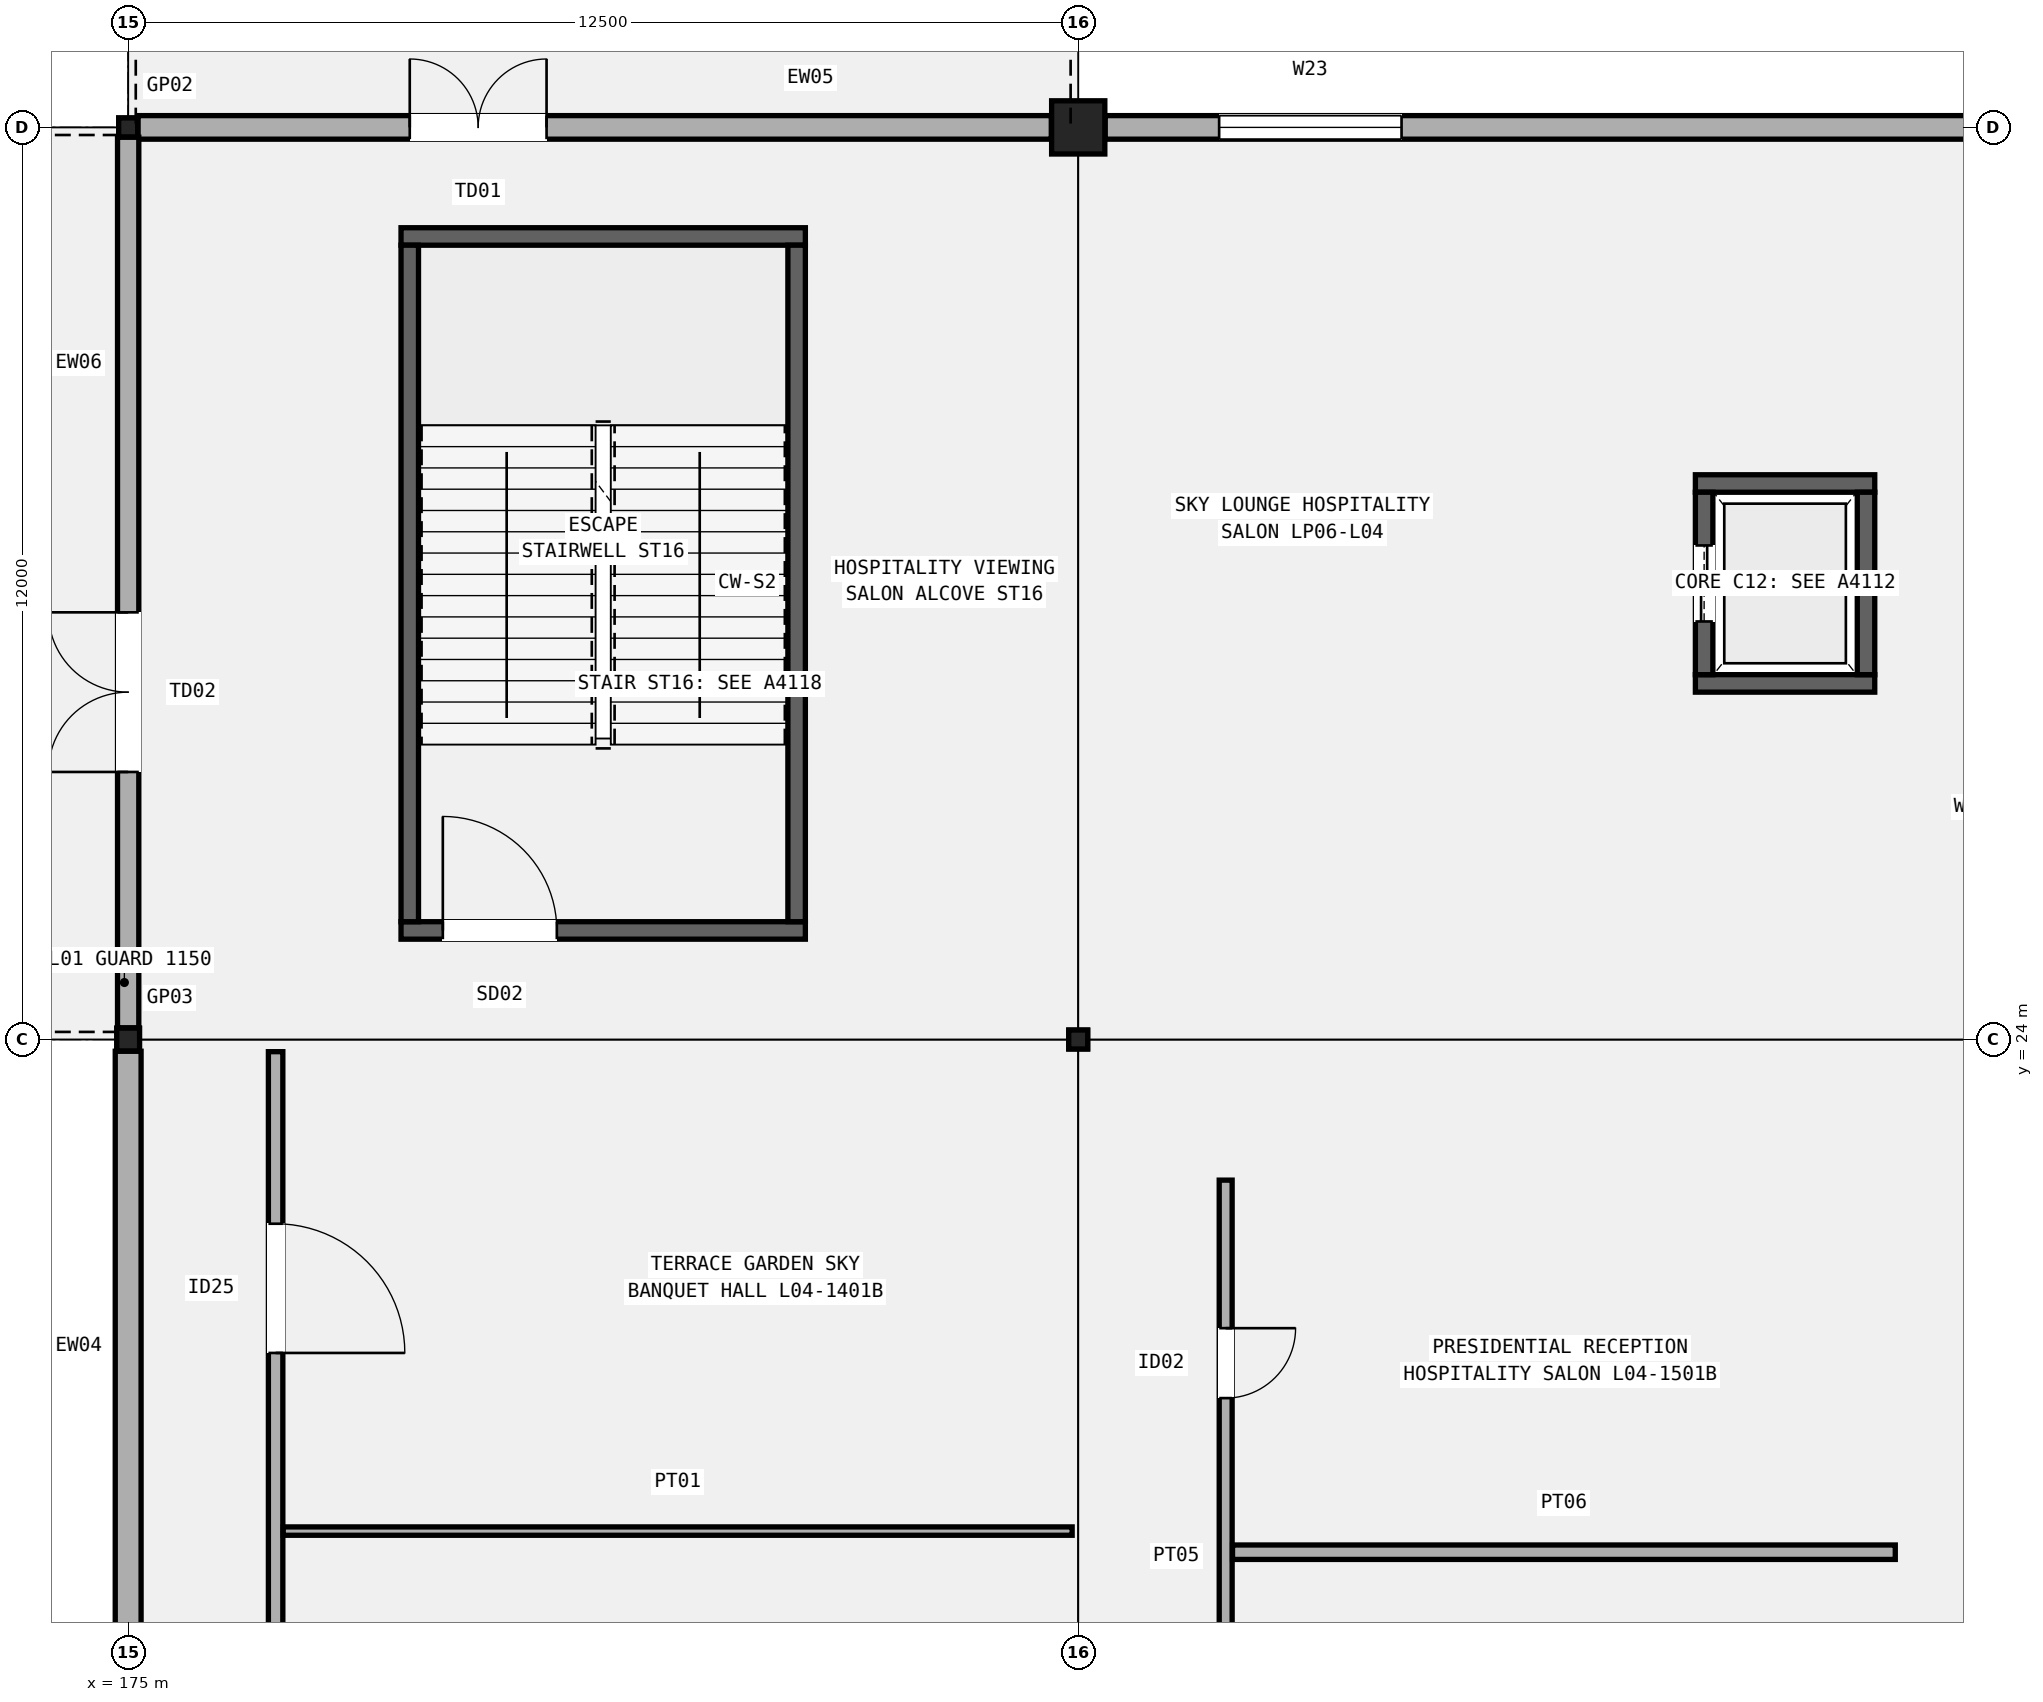
"""IFC4 building model, lengths in metres.
Left out: names, types, materials, properties, quantities, classifications, styles, units other than length and angle.
Written with IfcOpenShell. Run it as: python <this file> out.ifc"""

import sys

from ifc_helpers import new_model, si_unit, direction, frame, frame_2d, origin, origin_2d, place, context, subcontext, project, spatial, rectangle, hollow_rectangle, extrude, element, fill, save


model = new_model("IFC4")
c1 = context("Model", 3, precision=1e-05, world=origin(), true_north=direction((0.0, 1.0)))
c2 = subcontext(c1, "Body", "Model", "MODEL_VIEW")
j1 = project(units=[si_unit("LENGTHUNIT", "METRE"), si_unit("PLANEANGLEUNIT", "RADIAN")], contexts=[c1])
p1 = place(None, origin())
s1 = spatial("IfcSite", under=j1, at=p1, CompositionType="ELEMENT")
p2 = place(p1, origin())
s2 = spatial("IfcBuilding", under=s1, at=p2, CompositionType="ELEMENT")
p3 = place(p2, frame((0.0, 0.0, 20.4)))
s3 = spatial("IfcBuildingStorey", under=s2, at=p3, CompositionType="ELEMENT", Elevation=20.4)
p4 = place(p3, frame((175.0, 24.0, 0.0), z_axis=(0.0, 0.0, 1.0), x_axis=(1.0, 0.0, 0.0)))
e1 = element("IfcColumn", 1, at=p4, inside=s3, PredefinedType="COLUMN", context=c2, shape_type="SweptSolid", body=[
    extrude(hollow_rectangle(XDim=0.3, YDim=0.3, WallThickness=0.012, InnerFilletRadius=0.012, OuterFilletRadius=0.024, at=origin_2d()), origin(), (0.0, 0.0, 1.0), 5.4),
])
for number, where, z_axis, x_axis in (
    (2, (175.0, 36.0, 0.0), (0.0, 0.0, 1.0), (1.0, 0.0, 0.0)),
    (3, (187.5, 24.0, 0.0), (0.0, 0.0, 1.0), (1.0, 0.0, 0.0)),
):
    element("IfcColumn", number, at=place(p3, frame(where, z_axis=z_axis, x_axis=x_axis)), inside=s3, PredefinedType="COLUMN", context=c2, shape_type="SweptSolid", body=[
        extrude(hollow_rectangle(XDim=0.25, YDim=0.25, WallThickness=0.012, InnerFilletRadius=0.012, OuterFilletRadius=0.024, at=origin_2d()), origin(), (0.0, 0.0, 1.0), 5.4),
    ])
p5 = place(p3, frame((187.5, 36.0, 0.0), z_axis=(0.0, 0.0, 1.0), x_axis=(1.0, 0.0, 0.0)))
e4 = element("IfcColumn", 4, at=p5, inside=s3, PredefinedType="COLUMN", context=c2, shape_type="SweptSolid", body=[
    extrude(rectangle(XDim=0.7, YDim=0.7, at=origin_2d()), origin(), (0.0, 0.0, 1.0), 5.4),
])
p6 = place(p3, frame((175.0, 12.179, 0.0), z_axis=(0.0, 0.0, 1.0), x_axis=(0.0, 1.0, 0.0)))
e5 = element("IfcWall", 5, at=p6, inside=s3, PredefinedType="SOLIDWALL", context=c2, shape_type="SweptSolid", body=[
    extrude(rectangle(XDim=11.667, YDim=0.34, at=frame_2d((5.833, 0.0))), origin(), (0.0, 0.0, 1.0), 4.48),
])
p7 = place(p6, frame((1.5, 0.0, 0.95)))
e6 = element("IfcOpeningElement", 6, at=p7, cuts=e5, PredefinedType="OPENING", context=c2, shape_type="SweptSolid", body=[
    extrude(rectangle(XDim=2.1, YDim=2.25, at=frame_2d((1.05, 1.125))), frame((0.0, 0.18, 0.0), z_axis=(0.0, -1.0, 0.0), x_axis=(1.0, 0.0, 0.0)), (0.0, 0.0, 1.0), 0.36),
])
p8 = place(p3, frame((175.129, 36.0, 0.0), z_axis=(0.0, 0.0, 1.0), x_axis=(1.0, 0.0, 0.0)))
e7 = element("IfcWall", 7, at=p8, inside=s3, PredefinedType="SOLIDWALL", context=c2, shape_type="SweptSolid", body=[
    extrude(rectangle(XDim=12.017, YDim=0.31, at=frame_2d((6.009, 0.0))), origin(), (0.0, 0.0, 1.0), 4.592),
])
p9 = place(p8, frame((3.576, 0.0, 0.0)))
e8 = element("IfcOpeningElement", 8, at=p9, cuts=e7, PredefinedType="OPENING", context=c2, shape_type="SweptSolid", body=[
    extrude(rectangle(XDim=1.8, YDim=2.3, at=frame_2d((0.9, 1.15))), frame((0.0, 0.165, 0.0), z_axis=(0.0, -1.0, 0.0), x_axis=(1.0, 0.0, 0.0)), (0.0, 0.0, 1.0), 0.33),
])
p10 = place(p3, frame((175.0, 24.154, 0.0), z_axis=(0.0, 0.0, 1.0), x_axis=(0.0, 1.0, 0.0)))
e9 = element("IfcWall", 9, at=p10, inside=s3, PredefinedType="SOLIDWALL", context=c2, shape_type="SweptSolid", body=[
    extrude(rectangle(XDim=11.717, YDim=0.28, at=frame_2d((5.858, 0.0))), origin(), (0.0, 0.0, 1.0), 4.58),
])
p11 = place(p10, frame((3.366, 0.0, 0.0)))
e10 = element("IfcOpeningElement", 10, at=p11, cuts=e9, PredefinedType="OPENING", context=c2, shape_type="SweptSolid", body=[
    extrude(rectangle(XDim=2.1, YDim=2.35, at=frame_2d((1.05, 1.175))), frame((0.0, 0.15, 0.0), z_axis=(0.0, -1.0, 0.0), x_axis=(1.0, 0.0, 0.0)), (0.0, 0.0, 1.0), 0.3),
])
p12 = place(p3, frame((187.854, 36.0, 0.0), z_axis=(0.0, 0.0, 1.0), x_axis=(1.0, 0.0, 0.0)))
e11 = element("IfcWall", 11, at=p12, inside=s3, PredefinedType="SOLIDWALL", context=c2, shape_type="SweptSolid", body=[
    extrude(rectangle(XDim=11.842, YDim=0.31, at=frame_2d((5.921, 0.0))), origin(), (0.0, 0.0, 1.0), 4.48),
])
p13 = place(p12, frame((1.5, 0.0, 0.95)))
e12 = element("IfcOpeningElement", 12, at=p13, cuts=e11, PredefinedType="OPENING", context=c2, shape_type="SweptSolid", body=[
    extrude(rectangle(XDim=2.4, YDim=1.65, at=frame_2d((1.2, 0.825))), frame((0.0, 0.165, 0.0), z_axis=(0.0, -1.0, 0.0), x_axis=(1.0, 0.0, 0.0)), (0.0, 0.0, 1.0), 0.33),
])
p14 = place(p3, frame((178.59, 25.435, 0.0), z_axis=(0.0, 0.0, 1.0), x_axis=(1.0, 0.0, 0.0)))
e13 = element("IfcWall", 13, at=p14, inside=s3, PredefinedType="SHEAR", context=c2, shape_type="SweptSolid", body=[
    extrude(rectangle(XDim=5.32, YDim=0.23, at=frame_2d((2.66, 0.0))), origin(), (0.0, 0.0, 1.0), 5.18),
])
p15 = place(p14, frame((0.55, 0.0, 0.0)))
e14 = element("IfcOpeningElement", 14, at=p15, cuts=e13, PredefinedType="OPENING", context=c2, shape_type="SweptSolid", body=[
    extrude(rectangle(XDim=1.5, YDim=2.2, at=frame_2d((0.75, 1.1))), frame((0.0, 0.125, 0.0), z_axis=(0.0, -1.0, 0.0), x_axis=(1.0, 0.0, 0.0)), (0.0, 0.0, 1.0), 0.25),
])
p16 = place(p3, frame((178.59, 34.565, 0.0), z_axis=(0.0, 0.0, 1.0), x_axis=(1.0, 0.0, 0.0)))
e15 = element("IfcWall", 15, at=p16, inside=s3, PredefinedType="SHEAR", context=c2, shape_type="SweptSolid", body=[
    extrude(rectangle(XDim=5.32, YDim=0.23, at=frame_2d((2.66, 0.0))), origin(), (0.0, 0.0, 1.0), 5.18),
])
for number, where, z_axis, x_axis in (
    (16, (178.705, 25.55, 0.0), (0.0, 0.0, 1.0), (0.0, 1.0, 0.0)),
    (17, (183.795, 25.55, 0.0), (0.0, 0.0, 1.0), (0.0, 1.0, 0.0)),
):
    element("IfcWall", number, at=place(p3, frame(where, z_axis=z_axis, x_axis=x_axis)), inside=s3, PredefinedType="SHEAR", context=c2, shape_type="SweptSolid", body=[
        extrude(rectangle(XDim=8.9, YDim=0.23, at=frame_2d((4.45, 0.0))), origin(), (0.0, 0.0, 1.0), 5.18),
    ])
for number, where, z_axis, x_axis in (
    (18, (195.62, 28.685, 0.0), (0.0, 0.0, 1.0), (1.0, 0.0, 0.0)),
    (19, (195.62, 31.315, 0.0), (0.0, 0.0, 1.0), (1.0, 0.0, 0.0)),
):
    element("IfcWall", number, at=place(p3, frame(where, z_axis=z_axis, x_axis=x_axis)), inside=s3, PredefinedType="SHEAR", context=c2, shape_type="SweptSolid", body=[
        extrude(rectangle(XDim=2.36, YDim=0.23, at=frame_2d((1.18, 0.0))), origin(), (0.0, 0.0, 1.0), 5.18),
    ])
p17 = place(p3, frame((195.735, 28.8, 0.0), z_axis=(0.0, 0.0, 1.0), x_axis=(0.0, 1.0, 0.0)))
e20 = element("IfcWall", 20, at=p17, inside=s3, PredefinedType="SHEAR", context=c2, shape_type="SweptSolid", body=[
    extrude(rectangle(XDim=2.4, YDim=0.23, at=frame_2d((1.2, 0.0))), origin(), (0.0, 0.0, 1.0), 5.18),
])
p18 = place(p17, frame((0.7, 0.0, 0.0)))
e21 = element("IfcOpeningElement", 21, at=p18, cuts=e20, PredefinedType="OPENING", context=c2, shape_type="SweptSolid", body=[
    extrude(rectangle(XDim=1.0, YDim=2.15, at=frame_2d((0.5, 1.075))), frame((0.0, 0.125, 0.0), z_axis=(0.0, -1.0, 0.0), x_axis=(1.0, 0.0, 0.0)), (0.0, 0.0, 1.0), 0.25),
])
p19 = place(p3, frame((197.865, 28.8, 0.0), z_axis=(0.0, 0.0, 1.0), x_axis=(0.0, 1.0, 0.0)))
e22 = element("IfcWall", 22, at=p19, inside=s3, PredefinedType="SHEAR", context=c2, shape_type="SweptSolid", body=[
    extrude(rectangle(XDim=2.4, YDim=0.23, at=frame_2d((1.2, 0.0))), origin(), (0.0, 0.0, 1.0), 5.18),
])
p20 = place(p3, frame((176.94, 12.187, 0.0), z_axis=(0.0, 0.0, 1.0), x_axis=(0.0, 1.0, 0.0)))
e23 = element("IfcWall", 23, at=p20, inside=s3, PredefinedType="PARTITIONING", context=c2, shape_type="SweptSolid", body=[
    extrude(rectangle(XDim=11.653, YDim=0.19, at=frame_2d((5.827, 0.0))), origin(), (0.0, 0.0, 1.0), 4.52),
])
p21 = place(p20, frame((3.444, 0.0, 0.0), z_axis=(0.0, 0.0, 1.0), x_axis=(-1.0, 0.0, 0.0)))
e24 = element("IfcOpeningElement", 24, at=p21, cuts=e23, PredefinedType="OPENING", context=c2, shape_type="SweptSolid", body=[
    extrude(rectangle(XDim=1.65, YDim=2.28, at=frame_2d((0.825, 1.14))), frame((0.0, 0.105, 0.0), z_axis=(0.0, -1.0, 0.0), x_axis=(1.0, 0.0, 0.0)), (0.0, 0.0, 1.0), 0.21),
])
p22 = place(p20, frame((9.389, 0.0, 0.0), z_axis=(0.0, 0.0, 1.0), x_axis=(-1.0, 0.0, 0.0)))
e25 = element("IfcOpeningElement", 25, at=p22, cuts=e23, PredefinedType="OPENING", context=c2, shape_type="SweptSolid", body=[
    extrude(rectangle(XDim=1.7, YDim=2.32, at=frame_2d((0.85, 1.16))), frame((0.0, 0.105, 0.0), z_axis=(0.0, -1.0, 0.0), x_axis=(1.0, 0.0, 0.0)), (0.0, 0.0, 1.0), 0.21),
])
p23 = place(p3, frame((177.04, 17.533, 0.0), z_axis=(0.0, 0.0, 1.0), x_axis=(1.0, 0.0, 0.0)))
e26 = element("IfcWall", 26, at=p23, inside=s3, PredefinedType="PARTITIONING", context=c2, shape_type="SweptSolid", body=[
    extrude(rectangle(XDim=10.38, YDim=0.11, at=frame_2d((5.19, 0.0))), origin(), (0.0, 0.0, 1.0), 4.52),
])
p24 = place(p3, frame((189.44, 12.187, 0.0), z_axis=(0.0, 0.0, 1.0), x_axis=(0.0, 1.0, 0.0)))
e27 = element("IfcWall", 27, at=p24, inside=s3, PredefinedType="PARTITIONING", context=c2, shape_type="SweptSolid", body=[
    extrude(rectangle(XDim=9.963, YDim=0.17, at=frame_2d((4.981, 0.0))), origin(), (0.0, 0.0, 1.0), 4.52),
])
p25 = place(p24, frame((2.93, 0.0, 0.0), z_axis=(0.0, 0.0, 1.0), x_axis=(-1.0, 0.0, 0.0)))
e28 = element("IfcOpeningElement", 28, at=p25, cuts=e27, PredefinedType="OPENING", context=c2, shape_type="SweptSolid", body=[
    extrude(rectangle(XDim=0.9, YDim=2.06, at=frame_2d((0.45, 1.03))), frame((0.0, 0.095, 0.0), z_axis=(0.0, -1.0, 0.0), x_axis=(1.0, 0.0, 0.0)), (0.0, 0.0, 1.0), 0.19),
])
p26 = place(p24, frame((8.015, 0.0, 0.0), z_axis=(0.0, 0.0, 1.0), x_axis=(-1.0, 0.0, 0.0)))
e29 = element("IfcOpeningElement", 29, at=p26, cuts=e27, PredefinedType="OPENING", context=c2, shape_type="SweptSolid", body=[
    extrude(rectangle(XDim=0.92, YDim=2.1, at=frame_2d((0.46, 1.05))), frame((0.0, 0.095, 0.0), z_axis=(0.0, -1.0, 0.0), x_axis=(1.0, 0.0, 0.0)), (0.0, 0.0, 1.0), 0.19),
])
p27 = place(p3, frame((189.53, 17.255, 0.0), z_axis=(0.0, 0.0, 1.0), x_axis=(1.0, 0.0, 0.0)))
e30 = element("IfcWall", 30, at=p27, inside=s3, PredefinedType="PARTITIONING", context=c2, shape_type="SweptSolid", body=[
    extrude(rectangle(XDim=8.72, YDim=0.19, at=frame_2d((4.36, 0.0))), origin(), (0.0, 0.0, 1.0), 4.52),
])
p28 = place(p9, origin())
e31 = element("IfcDoor", 31, at=p28, inside=s3, OperationType="DOUBLE_DOOR_SINGLE_SWING", PredefinedType="DOOR", context=c2, shape_type="SweptSolid", body=[
    extrude(rectangle(XDim=1.8, YDim=2.3, at=frame_2d((0.9, 1.15))), frame((0.0, 0.025, 0.0), z_axis=(0.0, -1.0, 0.0), x_axis=(1.0, 0.0, 0.0)), (0.0, 0.0, 1.0), 0.05),
])
fill(e8, e31)
p29 = place(p11, origin())
e32 = element("IfcDoor", 32, at=p29, inside=s3, OperationType="DOUBLE_DOOR_SINGLE_SWING", PredefinedType="DOOR", context=c2, shape_type="SweptSolid", body=[
    extrude(rectangle(XDim=2.1, YDim=2.35, at=frame_2d((1.05, 1.175))), frame((0.0, 0.025, 0.0), z_axis=(0.0, -1.0, 0.0), x_axis=(1.0, 0.0, 0.0)), (0.0, 0.0, 1.0), 0.05),
])
fill(e10, e32)
p30 = place(p13, origin())
e33 = element("IfcWindow", 33, at=p30, inside=s3, PartitioningType="SINGLE_PANEL", PredefinedType="WINDOW", context=c2, shape_type="SweptSolid", body=[
    extrude(rectangle(XDim=2.4, YDim=1.65, at=frame_2d((1.2, 0.825))), frame((0.0, 0.03, 0.0), z_axis=(0.0, -1.0, 0.0), x_axis=(1.0, 0.0, 0.0)), (0.0, 0.0, 1.0), 0.06),
])
fill(e12, e33)
p31 = place(p15, origin())
e34 = element("IfcDoor", 34, at=p31, inside=s3, OperationType="SINGLE_SWING_LEFT", PredefinedType="DOOR", context=c2, shape_type="SweptSolid", body=[
    extrude(rectangle(XDim=1.5, YDim=2.2, at=frame_2d((0.75, 1.1))), frame((0.0, 0.025, 0.0), z_axis=(0.0, -1.0, 0.0), x_axis=(1.0, 0.0, 0.0)), (0.0, 0.0, 1.0), 0.05),
])
fill(e14, e34)
p32 = place(p18, origin())
e35 = element("IfcDoor", 35, at=p32, inside=s3, OperationType="DOUBLE_DOOR_SLIDING", PredefinedType="DOOR", context=c2, shape_type="SweptSolid", body=[
    extrude(rectangle(XDim=1.0, YDim=2.15, at=frame_2d((0.5, 1.075))), frame((0.0, 0.025, 0.0), z_axis=(0.0, -1.0, 0.0), x_axis=(1.0, 0.0, 0.0)), (0.0, 0.0, 1.0), 0.05),
])
fill(e21, e35)
p33 = place(p22, origin())
e36 = element("IfcDoor", 36, at=p33, inside=s3, OperationType="SINGLE_SWING_RIGHT", PredefinedType="DOOR", context=c2, shape_type="SweptSolid", body=[
    extrude(rectangle(XDim=1.7, YDim=2.32, at=frame_2d((0.85, 1.16))), frame((0.0, 0.025, 0.0), z_axis=(0.0, -1.0, 0.0), x_axis=(1.0, 0.0, 0.0)), (0.0, 0.0, 1.0), 0.05),
])
fill(e25, e36)
p34 = place(p26, origin())
e37 = element("IfcDoor", 37, at=p34, inside=s3, OperationType="SINGLE_SWING_LEFT", PredefinedType="DOOR", context=c2, shape_type="SweptSolid", body=[
    extrude(rectangle(XDim=0.92, YDim=2.1, at=frame_2d((0.46, 1.05))), frame((0.0, 0.025, 0.0), z_axis=(0.0, -1.0, 0.0), x_axis=(1.0, 0.0, 0.0)), (0.0, 0.0, 1.0), 0.05),
])
fill(e29, e37)
save(model, sys.argv[1])
